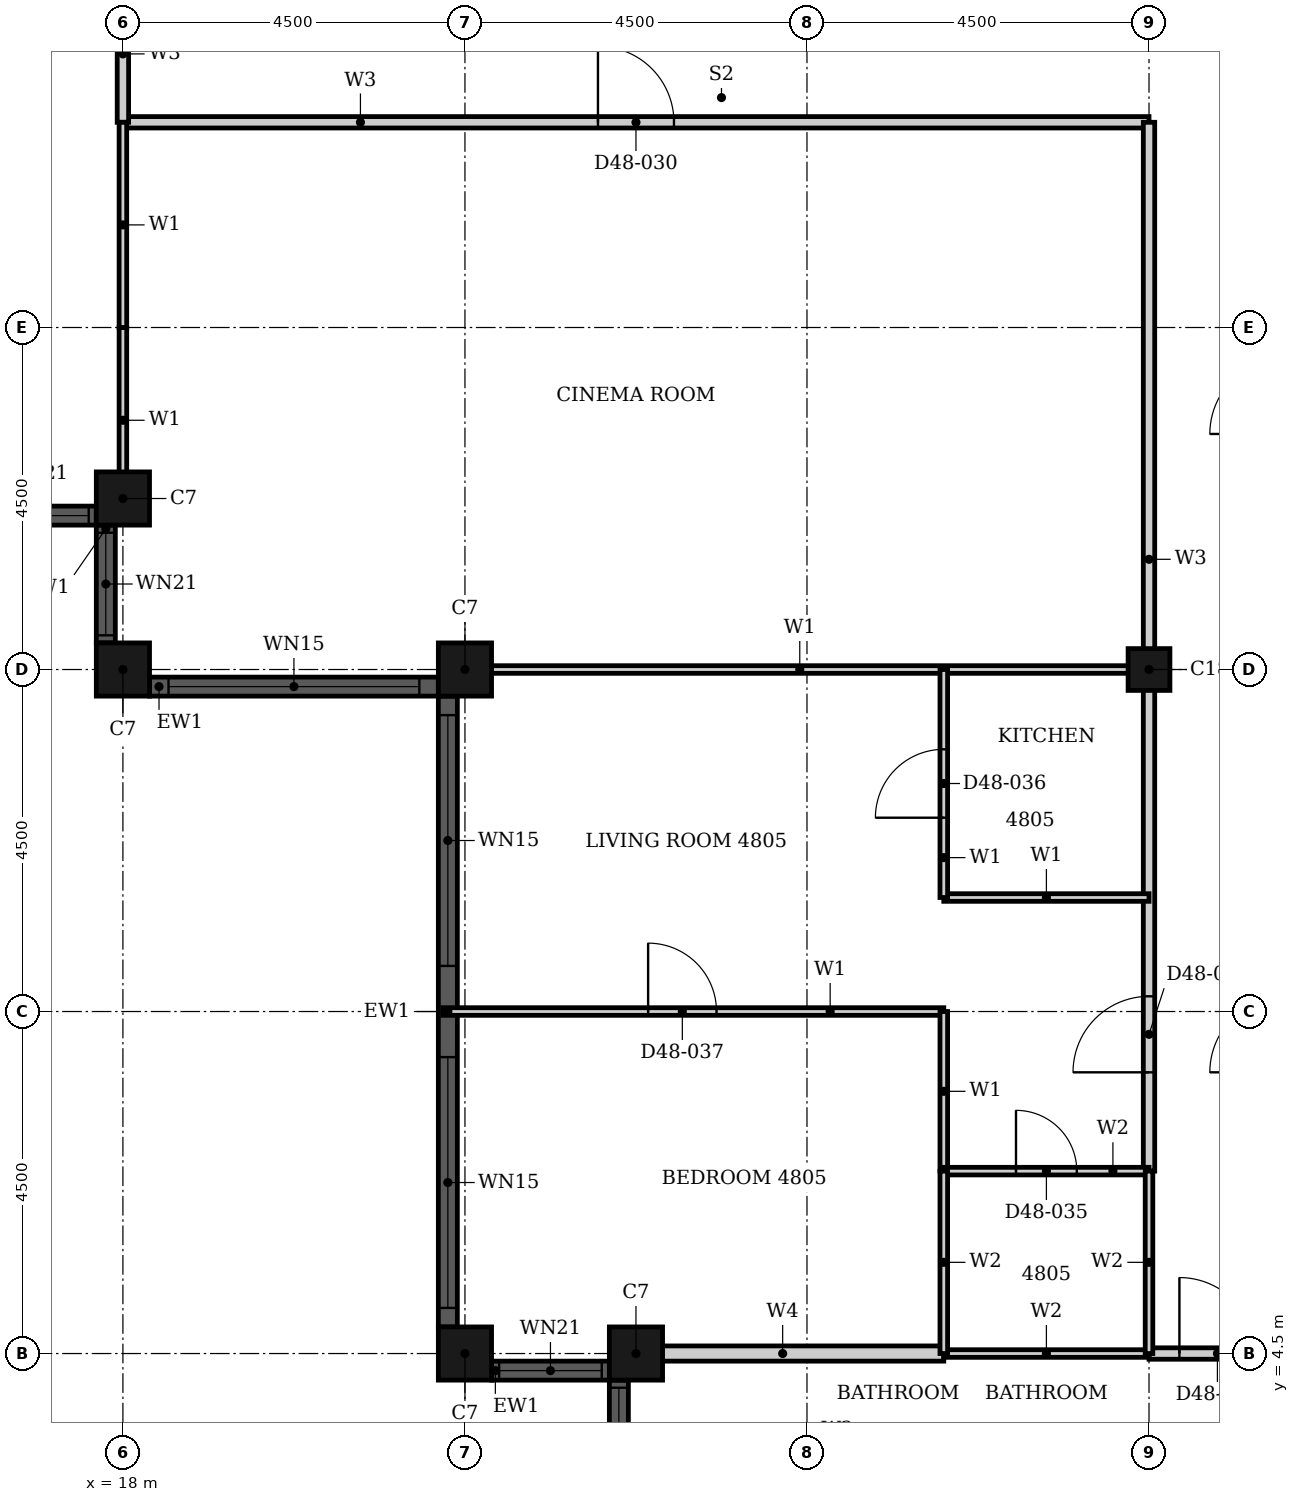
"""IFC4 building model, lengths in metres.
Left out: names, types, materials, properties, quantities, classifications, styles, units other than length and angle.
Written with IfcOpenShell. Run it as: python <this file> out.ifc"""

import sys

from ifc_helpers import new_model, si_unit, direction, frame, frame_2d, origin, origin_2d, place, context, subcontext, project, spatial, rectangle, hollow_rectangle, extrude, element, fill, save


model = new_model("IFC4")
c1 = context("Model", 3, precision=1e-05, world=origin(), true_north=direction((0.0, 1.0)))
c2 = subcontext(c1, "Body", "Model", "MODEL_VIEW")
j1 = project(units=[si_unit("LENGTHUNIT", "METRE"), si_unit("PLANEANGLEUNIT", "RADIAN")], contexts=[c1])
p1 = place(None, origin())
s1 = spatial("IfcSite", under=j1, at=p1, CompositionType="ELEMENT")
p2 = place(p1, origin())
s2 = spatial("IfcBuilding", under=s1, at=p2, CompositionType="ELEMENT")
p3 = place(p2, frame((0.0, 0.0, 192.4)))
s3 = spatial("IfcBuildingStorey", under=s2, at=p3, CompositionType="ELEMENT", Elevation=192.4)
for number, where, z_axis, x_axis in (
    (1, (18.0, 15.75, 0.0), (0.0, 0.0, 1.0), (1.0, 0.0, 0.0)),
    (2, (18.0, 13.5, 0.0), (0.0, 0.0, 1.0), (1.0, 0.0, 0.0)),
    (3, (22.5, 13.5, 0.0), (0.0, 0.0, 1.0), (1.0, 0.0, 0.0)),
    (4, (22.5, 4.5, 0.0), (0.0, 0.0, 1.0), (1.0, 0.0, 0.0)),
    (5, (24.75, 4.5, 0.0), (0.0, 0.0, 1.0), (1.0, 0.0, 0.0)),
):
    element("IfcColumn", number, at=place(p3, frame(where, z_axis=z_axis, x_axis=x_axis)), inside=s3, PredefinedType="COLUMN", context=c2, shape_type="SweptSolid", body=[
        extrude(hollow_rectangle(XDim=0.7, YDim=0.7, WallThickness=0.022, at=origin_2d()), origin(), (0.0, 0.0, 1.0), 3.7),
    ])
p4 = place(p3, frame((31.5, 13.5, 0.0), z_axis=(0.0, 0.0, 1.0), x_axis=(1.0, 0.0, 0.0)))
e6 = element("IfcColumn", 6, at=p4, inside=s3, PredefinedType="COLUMN", context=c2, shape_type="SweptSolid", body=[
    extrude(hollow_rectangle(XDim=0.55, YDim=0.55, WallThickness=0.018, at=origin_2d()), origin(), (0.0, 0.0, 1.0), 3.7),
])
p5 = place(p3, frame((16.1, 15.525, 0.0), z_axis=(0.0, 0.0, 1.0), x_axis=(1.0, 0.0, 0.0)))
e7 = element("IfcWall", 7, at=p5, inside=s3, PredefinedType="SOLIDWALL", context=c2, shape_type="SweptSolid", body=[
    extrude(rectangle(XDim=1.55, YDim=0.25, at=frame_2d((0.775, 0.0))), origin(), (0.0, 0.0, 1.0), 3.7),
])
p6 = place(p5, frame((0.1, 0.0, 0.9)))
e8 = element("IfcOpeningElement", 8, at=p6, cuts=e7, PredefinedType="OPENING", context=c2, shape_type="SweptSolid", body=[
    extrude(rectangle(XDim=1.35, YDim=1.85, at=frame_2d((0.675, 0.925))), frame((0.0, 0.135, 0.0), z_axis=(0.0, -1.0, 0.0), x_axis=(1.0, 0.0, 0.0)), (0.0, 0.0, 1.0), 0.27),
])
p7 = place(p3, frame((17.775, 15.4, 0.0), z_axis=(0.0, 0.0, 1.0), x_axis=(0.0, -1.0, 0.0)))
e9 = element("IfcWall", 9, at=p7, inside=s3, PredefinedType="SOLIDWALL", context=c2, shape_type="SweptSolid", body=[
    extrude(rectangle(XDim=1.55, YDim=0.25, at=frame_2d((0.775, 0.0))), origin(), (0.0, 0.0, 1.0), 3.7),
])
p8 = place(p7, frame((0.1, 0.0, 0.9)))
e10 = element("IfcOpeningElement", 10, at=p8, cuts=e9, PredefinedType="OPENING", context=c2, shape_type="SweptSolid", body=[
    extrude(rectangle(XDim=1.35, YDim=1.85, at=frame_2d((0.675, 0.925))), frame((0.0, 0.135, 0.0), z_axis=(0.0, -1.0, 0.0), x_axis=(1.0, 0.0, 0.0)), (0.0, 0.0, 1.0), 0.27),
])
p9 = place(p3, frame((18.35, 13.275, 0.0), z_axis=(0.0, 0.0, 1.0), x_axis=(1.0, 0.0, 0.0)))
e11 = element("IfcWall", 11, at=p9, inside=s3, PredefinedType="SOLIDWALL", context=c2, shape_type="SweptSolid", body=[
    extrude(rectangle(XDim=3.8, YDim=0.25, at=frame_2d((1.9, 0.0))), origin(), (0.0, 0.0, 1.0), 3.7),
])
p10 = place(p9, frame((0.25, 0.0, 0.45)))
e12 = element("IfcOpeningElement", 12, at=p10, cuts=e11, PredefinedType="OPENING", context=c2, shape_type="SweptSolid", body=[
    extrude(rectangle(XDim=3.3, YDim=2.3, at=frame_2d((1.65, 1.15))), frame((0.0, 0.135, 0.0), z_axis=(0.0, -1.0, 0.0), x_axis=(1.0, 0.0, 0.0)), (0.0, 0.0, 1.0), 0.27),
])
p11 = place(p3, frame((22.275, 13.15, 0.0), z_axis=(0.0, 0.0, 1.0), x_axis=(0.0, -1.0, 0.0)))
e13 = element("IfcWall", 13, at=p11, inside=s3, PredefinedType="SOLIDWALL", context=c2, shape_type="SweptSolid", body=[
    extrude(rectangle(XDim=8.3, YDim=0.25, at=frame_2d((4.15, 0.0))), origin(), (0.0, 0.0, 1.0), 3.7),
])
p12 = place(p11, frame((0.25, 0.0, 0.45)))
e14 = element("IfcOpeningElement", 14, at=p12, cuts=e13, PredefinedType="OPENING", context=c2, shape_type="SweptSolid", body=[
    extrude(rectangle(XDim=3.3, YDim=2.3, at=frame_2d((1.65, 1.15))), frame((0.0, 0.135, 0.0), z_axis=(0.0, -1.0, 0.0), x_axis=(1.0, 0.0, 0.0)), (0.0, 0.0, 1.0), 0.27),
])
p13 = place(p11, frame((4.75, 0.0, 0.45)))
e15 = element("IfcOpeningElement", 15, at=p13, cuts=e13, PredefinedType="OPENING", context=c2, shape_type="SweptSolid", body=[
    extrude(rectangle(XDim=3.3, YDim=2.3, at=frame_2d((1.65, 1.15))), frame((0.0, 0.135, 0.0), z_axis=(0.0, -1.0, 0.0), x_axis=(1.0, 0.0, 0.0)), (0.0, 0.0, 1.0), 0.27),
])
p14 = place(p3, frame((22.85, 4.275, 0.0), z_axis=(0.0, 0.0, 1.0), x_axis=(1.0, 0.0, 0.0)))
e16 = element("IfcWall", 16, at=p14, inside=s3, PredefinedType="SOLIDWALL", context=c2, shape_type="SweptSolid", body=[
    extrude(rectangle(XDim=1.55, YDim=0.25, at=frame_2d((0.775, 0.0))), origin(), (0.0, 0.0, 1.0), 3.7),
])
p15 = place(p14, frame((0.1, 0.0, 0.9)))
e17 = element("IfcOpeningElement", 17, at=p15, cuts=e16, PredefinedType="OPENING", context=c2, shape_type="SweptSolid", body=[
    extrude(rectangle(XDim=1.35, YDim=1.85, at=frame_2d((0.675, 0.925))), frame((0.0, 0.135, 0.0), z_axis=(0.0, -1.0, 0.0), x_axis=(1.0, 0.0, 0.0)), (0.0, 0.0, 1.0), 0.27),
])
p16 = place(p3, frame((24.525, 4.15, 0.0), z_axis=(0.0, 0.0, 1.0), x_axis=(0.0, -1.0, 0.0)))
e18 = element("IfcWall", 18, at=p16, inside=s3, PredefinedType="SOLIDWALL", context=c2, shape_type="SweptSolid", body=[
    extrude(rectangle(XDim=1.55, YDim=0.25, at=frame_2d((0.775, 0.0))), origin(), (0.0, 0.0, 1.0), 3.7),
])
p17 = place(p16, frame((0.1, 0.0, 0.9)))
e19 = element("IfcOpeningElement", 19, at=p17, cuts=e18, PredefinedType="OPENING", context=c2, shape_type="SweptSolid", body=[
    extrude(rectangle(XDim=1.35, YDim=1.85, at=frame_2d((0.675, 0.925))), frame((0.0, 0.135, 0.0), z_axis=(0.0, -1.0, 0.0), x_axis=(1.0, 0.0, 0.0)), (0.0, 0.0, 1.0), 0.27),
])
p18 = place(p3, frame((18.0, 20.7, 0.0), z_axis=(0.0, 0.0, 1.0), x_axis=(1.0, 0.0, 0.0)))
e20 = element("IfcWall", 20, at=p18, inside=s3, PredefinedType="PARTITIONING", context=c2, shape_type="SweptSolid", body=[
    extrude(rectangle(XDim=13.5, YDim=0.15, at=frame_2d((6.75, 0.0))), origin(), (0.0, 0.0, 1.0), 3.4),
])
p19 = place(p18, frame((6.25, 0.0, 0.0)))
e21 = element("IfcOpeningElement", 21, at=p19, cuts=e20, PredefinedType="OPENING", context=c2, shape_type="SweptSolid", body=[
    extrude(rectangle(XDim=1.0, YDim=2.1, at=frame_2d((0.5, 1.05))), frame((0.0, 0.085, 0.0), z_axis=(0.0, -1.0, 0.0), x_axis=(1.0, 0.0, 0.0)), (0.0, 0.0, 1.0), 0.17),
])
p20 = place(p3, frame((31.5, 4.5, 0.0), z_axis=(0.0, 0.0, 1.0), x_axis=(1.0, 0.0, 0.0)))
e22 = element("IfcWall", 22, at=p20, inside=s3, PredefinedType="PARTITIONING", context=c2, shape_type="SweptSolid", body=[
    extrude(rectangle(XDim=1.8, YDim=0.15, at=frame_2d((0.9, 0.0))), origin(), (0.0, 0.0, 1.0), 3.4),
])
p21 = place(p20, frame((0.4, 0.0, 0.0)))
e23 = element("IfcOpeningElement", 23, at=p21, cuts=e22, PredefinedType="OPENING", context=c2, shape_type="SweptSolid", body=[
    extrude(rectangle(XDim=1.0, YDim=2.2, at=frame_2d((0.5, 1.1))), frame((0.0, 0.085, 0.0), z_axis=(0.0, -1.0, 0.0), x_axis=(1.0, 0.0, 0.0)), (0.0, 0.0, 1.0), 0.17),
])
p22 = place(p3, frame((18.0, 20.7, 0.0), z_axis=(0.0, 0.0, 1.0), x_axis=(0.0, 1.0, 0.0)))
e24 = element("IfcWall", 24, at=p22, inside=s3, PredefinedType="PARTITIONING", context=c2, shape_type="SweptSolid", body=[
    extrude(rectangle(XDim=1.8, YDim=0.15, at=frame_2d((0.9, 0.0))), origin(), (0.0, 0.0, 1.0), 3.4),
])
p23 = place(p3, frame((31.5, 6.9, 0.0), z_axis=(0.0, 0.0, 1.0), x_axis=(0.0, 1.0, 0.0)))
e25 = element("IfcWall", 25, at=p23, inside=s3, PredefinedType="PARTITIONING", context=c2, shape_type="SweptSolid", body=[
    extrude(rectangle(XDim=13.8, YDim=0.15, at=frame_2d((6.9, 0.0))), origin(), (0.0, 0.0, 1.0), 2.68),
])
p24 = place(p23, frame((1.3, 0.0, 0.0)))
e26 = element("IfcOpeningElement", 26, at=p24, cuts=e25, PredefinedType="OPENING", context=c2, shape_type="SweptSolid", body=[
    extrude(rectangle(XDim=1.0, YDim=2.2, at=frame_2d((0.5, 1.1))), frame((0.0, 0.085, 0.0), z_axis=(0.0, -1.0, 0.0), x_axis=(1.0, 0.0, 0.0)), (0.0, 0.0, 1.0), 0.17),
])
p25 = place(p3, frame((28.8, 10.5, 0.0), z_axis=(0.0, 0.0, 1.0), x_axis=(1.0, 0.0, 0.0)))
e27 = element("IfcWall", 27, at=p25, inside=s3, PredefinedType="PARTITIONING", context=c2, shape_type="SweptSolid", body=[
    extrude(rectangle(XDim=2.7, YDim=0.1, at=frame_2d((1.35, 0.0))), origin(), (0.0, 0.0, 1.0), 3.4),
])
p26 = place(p3, frame((22.31, 13.5, 0.0), z_axis=(0.0, 0.0, 1.0), x_axis=(1.0, 0.0, 0.0)))
e28 = element("IfcWall", 28, at=p26, inside=s3, PredefinedType="PARTITIONING", context=c2, shape_type="SweptSolid", body=[
    extrude(rectangle(XDim=9.19, YDim=0.1, at=frame_2d((4.595, 0.0))), origin(), (0.0, 0.0, 1.0), 2.48),
])
p27 = place(p3, frame((22.21, 9.0, 0.0), z_axis=(0.0, 0.0, 1.0), x_axis=(1.0, 0.0, 0.0)))
e29 = element("IfcWall", 29, at=p27, inside=s3, PredefinedType="PARTITIONING", context=c2, shape_type="SweptSolid", body=[
    extrude(rectangle(XDim=6.59, YDim=0.1, at=frame_2d((3.295, 0.0))), origin(), (0.0, 0.0, 1.0), 3.4),
])
p28 = place(p27, frame((2.7, 0.0, 0.0)))
e30 = element("IfcOpeningElement", 30, at=p28, cuts=e29, PredefinedType="OPENING", context=c2, shape_type="SweptSolid", body=[
    extrude(rectangle(XDim=0.9, YDim=2.1, at=frame_2d((0.45, 1.05))), frame((0.0, 0.06, 0.0), z_axis=(0.0, -1.0, 0.0), x_axis=(1.0, 0.0, 0.0)), (0.0, 0.0, 1.0), 0.12),
])
p29 = place(p3, frame((18.0, 15.56, 0.0), z_axis=(0.0, 0.0, 1.0), x_axis=(0.0, 1.0, 0.0)))
e31 = element("IfcWall", 31, at=p29, inside=s3, PredefinedType="PARTITIONING", context=c2, shape_type="SweptSolid", body=[
    extrude(rectangle(XDim=2.439, YDim=0.1, at=frame_2d((1.219, 0.0))), origin(), (0.0, 0.0, 1.0), 3.4),
])
p30 = place(p3, frame((18.0, 18.0, 0.0), z_axis=(0.0, 0.0, 1.0), x_axis=(0.0, 1.0, 0.0)))
e32 = element("IfcWall", 32, at=p30, inside=s3, PredefinedType="PARTITIONING", context=c2, shape_type="SweptSolid", body=[
    extrude(rectangle(XDim=2.7, YDim=0.1, at=frame_2d((1.35, 0.0))), origin(), (0.0, 0.0, 1.0), 3.4),
])
p31 = place(p3, frame((28.8, 6.9, 0.0), z_axis=(0.0, 0.0, 1.0), x_axis=(0.0, 1.0, 0.0)))
e33 = element("IfcWall", 33, at=p31, inside=s3, PredefinedType="PARTITIONING", context=c2, shape_type="SweptSolid", body=[
    extrude(rectangle(XDim=2.1, YDim=0.1, at=frame_2d((1.05, 0.0))), origin(), (0.0, 0.0, 1.0), 3.4),
])
p32 = place(p3, frame((28.8, 10.5, 0.0), z_axis=(0.0, 0.0, 1.0), x_axis=(0.0, 1.0, 0.0)))
e34 = element("IfcWall", 34, at=p32, inside=s3, PredefinedType="PARTITIONING", context=c2, shape_type="SweptSolid", body=[
    extrude(rectangle(XDim=3.0, YDim=0.1, at=frame_2d((1.5, 0.0))), origin(), (0.0, 0.0, 1.0), 3.4),
])
p33 = place(p32, frame((1.05, 0.0, 0.0)))
e35 = element("IfcOpeningElement", 35, at=p33, cuts=e34, PredefinedType="OPENING", context=c2, shape_type="SweptSolid", body=[
    extrude(rectangle(XDim=0.9, YDim=2.1, at=frame_2d((0.45, 1.05))), frame((0.0, 0.06, 0.0), z_axis=(0.0, -1.0, 0.0), x_axis=(1.0, 0.0, 0.0)), (0.0, 0.0, 1.0), 0.12),
])
p34 = place(p3, frame((24.56, 4.5, 0.0), z_axis=(0.0, 0.0, 1.0), x_axis=(1.0, 0.0, 0.0)))
e36 = element("IfcWall", 36, at=p34, inside=s3, PredefinedType="PARTITIONING", context=c2, shape_type="SweptSolid", body=[
    extrude(rectangle(XDim=4.24, YDim=0.2, at=frame_2d((2.12, 0.0))), origin(), (0.0, 0.0, 1.0), 3.4),
])
p35 = place(p3, frame((28.8, 4.5, 0.0), z_axis=(0.0, 0.0, 1.0), x_axis=(1.0, 0.0, 0.0)))
e37 = element("IfcWall", 37, at=p35, inside=s3, PredefinedType="PARTITIONING", context=c2, shape_type="SweptSolid", body=[
    extrude(rectangle(XDim=2.7, YDim=0.1, at=frame_2d((1.35, 0.0))), origin(), (0.0, 0.0, 1.0), 3.4),
])
p36 = place(p3, frame((28.8, 6.9, 0.0), z_axis=(0.0, 0.0, 1.0), x_axis=(1.0, 0.0, 0.0)))
e38 = element("IfcWall", 38, at=p36, inside=s3, PredefinedType="PARTITIONING", context=c2, shape_type="SweptSolid", body=[
    extrude(rectangle(XDim=2.7, YDim=0.1, at=frame_2d((1.35, 0.0))), origin(), (0.0, 0.0, 1.0), 3.4),
])
p37 = place(p36, frame((0.95, 0.0, 0.0)))
e39 = element("IfcOpeningElement", 39, at=p37, cuts=e38, PredefinedType="OPENING", context=c2, shape_type="SweptSolid", body=[
    extrude(rectangle(XDim=0.8, YDim=2.1, at=frame_2d((0.4, 1.05))), frame((0.0, 0.06, 0.0), z_axis=(0.0, -1.0, 0.0), x_axis=(1.0, 0.0, 0.0)), (0.0, 0.0, 1.0), 0.12),
])
p38 = place(p3, frame((28.8, 4.5, 0.0), z_axis=(0.0, 0.0, 1.0), x_axis=(0.0, 1.0, 0.0)))
e40 = element("IfcWall", 40, at=p38, inside=s3, PredefinedType="PARTITIONING", context=c2, shape_type="SweptSolid", body=[
    extrude(rectangle(XDim=2.4, YDim=0.1, at=frame_2d((1.2, 0.0))), origin(), (0.0, 0.0, 1.0), 3.4),
])
p39 = place(p3, frame((31.5, 4.5, 0.0), z_axis=(0.0, 0.0, 1.0), x_axis=(0.0, 1.0, 0.0)))
e41 = element("IfcWall", 41, at=p39, inside=s3, PredefinedType="PARTITIONING", context=c2, shape_type="SweptSolid", body=[
    extrude(rectangle(XDim=2.4, YDim=0.1, at=frame_2d((1.2, 0.0))), origin(), (0.0, 0.0, 1.0), 2.68),
])
p40 = place(p6, origin())
e42 = element("IfcWindow", 42, at=p40, inside=s3, PartitioningType="SINGLE_PANEL", PredefinedType="WINDOW", context=c2, shape_type="SweptSolid", body=[
    extrude(rectangle(XDim=1.35, YDim=1.85, at=frame_2d((0.675, 0.925))), frame((0.0, 0.03, 0.0), z_axis=(0.0, -1.0, 0.0), x_axis=(1.0, 0.0, 0.0)), (0.0, 0.0, 1.0), 0.06),
])
fill(e8, e42)
p41 = place(p8, origin())
e43 = element("IfcWindow", 43, at=p41, inside=s3, PartitioningType="SINGLE_PANEL", PredefinedType="WINDOW", context=c2, shape_type="SweptSolid", body=[
    extrude(rectangle(XDim=1.35, YDim=1.85, at=frame_2d((0.675, 0.925))), frame((0.0, 0.03, 0.0), z_axis=(0.0, -1.0, 0.0), x_axis=(1.0, 0.0, 0.0)), (0.0, 0.0, 1.0), 0.06),
])
fill(e10, e43)
p42 = place(p10, origin())
e44 = element("IfcWindow", 44, at=p42, inside=s3, PartitioningType="SINGLE_PANEL", PredefinedType="WINDOW", context=c2, shape_type="SweptSolid", body=[
    extrude(rectangle(XDim=3.3, YDim=2.3, at=frame_2d((1.65, 1.15))), frame((0.0, 0.03, 0.0), z_axis=(0.0, -1.0, 0.0), x_axis=(1.0, 0.0, 0.0)), (0.0, 0.0, 1.0), 0.06),
])
fill(e12, e44)
p43 = place(p12, origin())
e45 = element("IfcWindow", 45, at=p43, inside=s3, PartitioningType="SINGLE_PANEL", PredefinedType="WINDOW", context=c2, shape_type="SweptSolid", body=[
    extrude(rectangle(XDim=3.3, YDim=2.3, at=frame_2d((1.65, 1.15))), frame((0.0, 0.03, 0.0), z_axis=(0.0, -1.0, 0.0), x_axis=(1.0, 0.0, 0.0)), (0.0, 0.0, 1.0), 0.06),
])
fill(e14, e45)
p44 = place(p13, origin())
e46 = element("IfcWindow", 46, at=p44, inside=s3, PartitioningType="SINGLE_PANEL", PredefinedType="WINDOW", context=c2, shape_type="SweptSolid", body=[
    extrude(rectangle(XDim=3.3, YDim=2.3, at=frame_2d((1.65, 1.15))), frame((0.0, 0.03, 0.0), z_axis=(0.0, -1.0, 0.0), x_axis=(1.0, 0.0, 0.0)), (0.0, 0.0, 1.0), 0.06),
])
fill(e15, e46)
p45 = place(p15, origin())
e47 = element("IfcWindow", 47, at=p45, inside=s3, PartitioningType="SINGLE_PANEL", PredefinedType="WINDOW", context=c2, shape_type="SweptSolid", body=[
    extrude(rectangle(XDim=1.35, YDim=1.85, at=frame_2d((0.675, 0.925))), frame((0.0, 0.03, 0.0), z_axis=(0.0, -1.0, 0.0), x_axis=(1.0, 0.0, 0.0)), (0.0, 0.0, 1.0), 0.06),
])
fill(e17, e47)
p46 = place(p17, origin())
e48 = element("IfcWindow", 48, at=p46, inside=s3, PartitioningType="SINGLE_PANEL", PredefinedType="WINDOW", context=c2, shape_type="SweptSolid", body=[
    extrude(rectangle(XDim=1.35, YDim=1.85, at=frame_2d((0.675, 0.925))), frame((0.0, 0.03, 0.0), z_axis=(0.0, -1.0, 0.0), x_axis=(1.0, 0.0, 0.0)), (0.0, 0.0, 1.0), 0.06),
])
fill(e19, e48)
p47 = place(p19, origin())
e49 = element("IfcDoor", 49, at=p47, inside=s3, OperationType="SINGLE_SWING_LEFT", PredefinedType="DOOR", context=c2, shape_type="SweptSolid", body=[
    extrude(rectangle(XDim=1.0, YDim=2.1, at=frame_2d((0.5, 1.05))), frame((0.0, 0.025, 0.0), z_axis=(0.0, -1.0, 0.0), x_axis=(1.0, 0.0, 0.0)), (0.0, 0.0, 1.0), 0.05),
])
fill(e21, e49)
p48 = place(p24, origin())
e50 = element("IfcDoor", 50, at=p48, inside=s3, OperationType="SINGLE_SWING_LEFT", PredefinedType="DOOR", context=c2, shape_type="SweptSolid", body=[
    extrude(rectangle(XDim=1.0, YDim=2.2, at=frame_2d((0.5, 1.1))), frame((0.0, 0.025, 0.0), z_axis=(0.0, -1.0, 0.0), x_axis=(1.0, 0.0, 0.0)), (0.0, 0.0, 1.0), 0.05),
])
fill(e26, e50)
p49 = place(p37, origin())
e51 = element("IfcDoor", 51, at=p49, inside=s3, OperationType="SINGLE_SWING_LEFT", PredefinedType="DOOR", context=c2, shape_type="SweptSolid", body=[
    extrude(rectangle(XDim=0.8, YDim=2.1, at=frame_2d((0.4, 1.05))), frame((0.0, 0.025, 0.0), z_axis=(0.0, -1.0, 0.0), x_axis=(1.0, 0.0, 0.0)), (0.0, 0.0, 1.0), 0.05),
])
fill(e39, e51)
p50 = place(p33, origin())
e52 = element("IfcDoor", 52, at=p50, inside=s3, OperationType="SINGLE_SWING_LEFT", PredefinedType="DOOR", context=c2, shape_type="SweptSolid", body=[
    extrude(rectangle(XDim=0.9, YDim=2.1, at=frame_2d((0.45, 1.05))), frame((0.0, 0.025, 0.0), z_axis=(0.0, -1.0, 0.0), x_axis=(1.0, 0.0, 0.0)), (0.0, 0.0, 1.0), 0.05),
])
fill(e35, e52)
p51 = place(p28, origin())
e53 = element("IfcDoor", 53, at=p51, inside=s3, OperationType="SINGLE_SWING_LEFT", PredefinedType="DOOR", context=c2, shape_type="SweptSolid", body=[
    extrude(rectangle(XDim=0.9, YDim=2.1, at=frame_2d((0.45, 1.05))), frame((0.0, 0.025, 0.0), z_axis=(0.0, -1.0, 0.0), x_axis=(1.0, 0.0, 0.0)), (0.0, 0.0, 1.0), 0.05),
])
fill(e30, e53)
p52 = place(p21, origin())
e54 = element("IfcDoor", 54, at=p52, inside=s3, OperationType="SINGLE_SWING_RIGHT", PredefinedType="DOOR", context=c2, shape_type="SweptSolid", body=[
    extrude(rectangle(XDim=1.0, YDim=2.2, at=frame_2d((0.5, 1.1))), frame((0.0, 0.025, 0.0), z_axis=(0.0, -1.0, 0.0), x_axis=(1.0, 0.0, 0.0)), (0.0, 0.0, 1.0), 0.05),
])
fill(e23, e54)
save(model, sys.argv[1])
